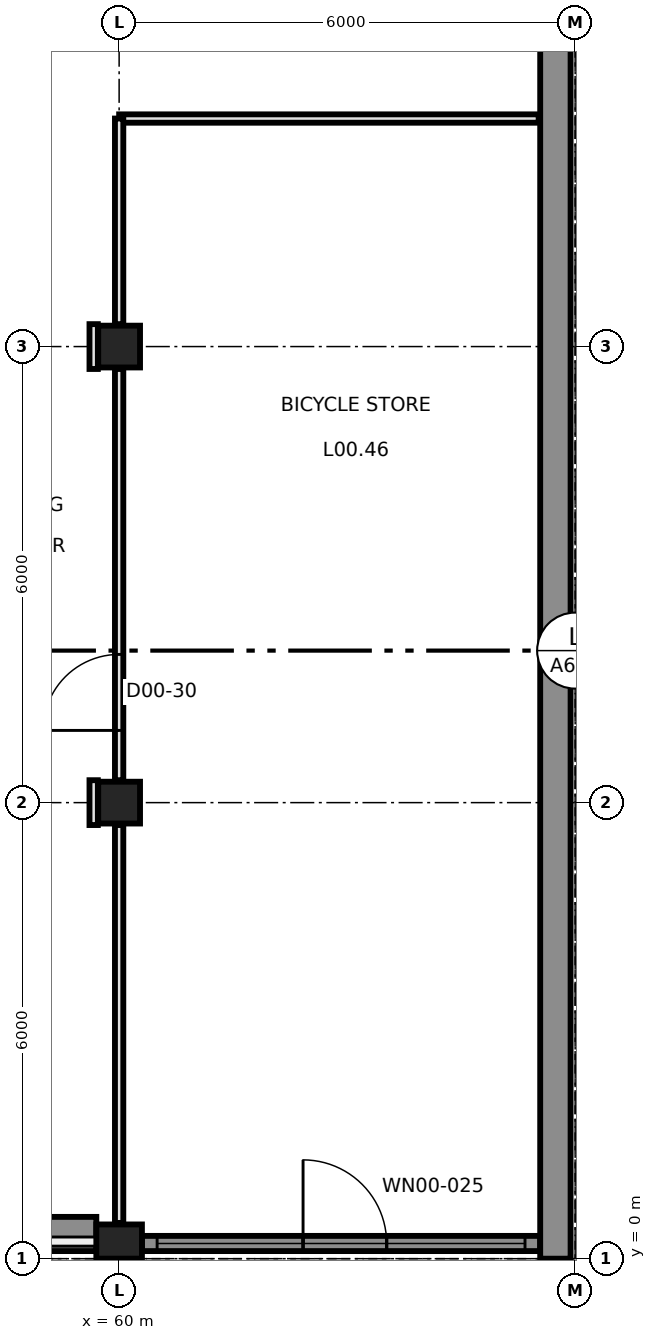
"""IFC4 building model, lengths in metres.
Left out: names, types, materials, properties, quantities, classifications, styles, units other than length and angle.
Written with IfcOpenShell. Run it as: python <this file> out.ifc"""

import sys

from ifc_helpers import new_model, si_unit, direction, frame, frame_2d, origin, origin_2d, place, context, subcontext, project, spatial, rectangle, extrude, element, fill, save


model = new_model("IFC4")
c1 = context("Model", 3, precision=1e-05, world=origin(), true_north=direction((0.0, 1.0)))
c2 = subcontext(c1, "Body", "Model", "MODEL_VIEW")
j1 = project(units=[si_unit("LENGTHUNIT", "METRE"), si_unit("PLANEANGLEUNIT", "RADIAN")], contexts=[c1])
p1 = place(None, origin())
s1 = spatial("IfcSite", under=j1, at=p1, CompositionType="ELEMENT")
p2 = place(p1, origin())
s2 = spatial("IfcBuilding", under=s1, at=p2, CompositionType="ELEMENT")
p3 = place(p2, origin())
s3 = spatial("IfcBuildingStorey", under=s2, at=p3, CompositionType="ELEMENT", Elevation=0.0)
p4 = place(p3, frame((60.0, 0.226, -0.3), z_axis=(0.0, 0.0, 1.0), x_axis=(1.0, 0.0, 0.0)))
e1 = element("IfcColumn", 1, at=p4, inside=s3, PredefinedType="COLUMN", context=c2, shape_type="SweptSolid", body=[
    extrude(rectangle(XDim=0.6, YDim=0.45, at=origin_2d()), origin(), (0.0, 0.0, 1.0), 7.3),
])
for number, where, z_axis, x_axis in (
    (2, (60.0, 6.0, -0.3), (0.0, 0.0, 1.0), (1.0, 0.0, 0.0)),
    (3, (60.0, 12.0, -0.3), (0.0, 0.0, 1.0), (1.0, 0.0, 0.0)),
):
    element("IfcColumn", number, at=place(p3, frame(where, z_axis=z_axis, x_axis=x_axis)), inside=s3, PredefinedType="COLUMN", context=c2, shape_type="SweptSolid", body=[
        extrude(rectangle(XDim=0.55, YDim=0.55, at=origin_2d()), origin(), (0.0, 0.0, 1.0), 7.3),
    ])
p5 = place(p3, frame((65.74, 0.0, -0.3), z_axis=(0.0, 0.0, 1.0), x_axis=(0.0, 1.0, 0.0)))
e4 = element("IfcWall", 4, at=p5, inside=s3, PredefinedType="SOLIDWALL", context=c2, shape_type="SweptSolid", body=[
    extrude(rectangle(XDim=18.0, YDim=0.4, at=frame_2d((9.0, 0.0))), origin(), (0.0, 0.0, 1.0), 7.3),
])
p6 = place(p3, frame((65.54, 0.2, 0.0), z_axis=(0.0, 0.0, 1.0), x_axis=(-1.0, 0.0, 0.0)))
e5 = element("IfcWall", 5, at=p6, inside=s3, PredefinedType="SOLIDWALL", context=c2, shape_type="SweptSolid", body=[
    extrude(rectangle(XDim=5.24, YDim=0.2, at=frame_2d((2.62, 0.0))), origin(), (0.0, 0.0, 1.0), 6.75),
])
p7 = place(p6, frame((2.02, 0.0, 0.0)))
e6 = element("IfcOpeningElement", 6, at=p7, cuts=e5, PredefinedType="OPENING", context=c2, shape_type="SweptSolid", body=[
    extrude(rectangle(XDim=1.1, YDim=2.4, at=frame_2d((0.55, 1.2))), frame((0.0, 0.11, 0.0), z_axis=(0.0, -1.0, 0.0), x_axis=(1.0, 0.0, 0.0)), (0.0, 0.0, 1.0), 0.22),
])
p8 = place(p6, frame((2.02, 0.0, 2.5)))
e7 = element("IfcOpeningElement", 7, at=p8, cuts=e5, PredefinedType="OPENING", context=c2, shape_type="SweptSolid", body=[
    extrude(rectangle(XDim=1.1, YDim=3.9, at=frame_2d((0.55, 1.95))), frame((0.0, 0.11, 0.0), z_axis=(0.0, -1.0, 0.0), x_axis=(1.0, 0.0, 0.0)), (0.0, 0.0, 1.0), 0.22),
])
p9 = place(p6, frame((0.2, 0.0, 0.1)))
e8 = element("IfcOpeningElement", 8, at=p9, cuts=e5, PredefinedType="OPENING", context=c2, shape_type="SweptSolid", body=[
    extrude(rectangle(XDim=1.82, YDim=6.3, at=frame_2d((0.91, 3.15))), frame((0.0, 0.11, 0.0), z_axis=(0.0, -1.0, 0.0), x_axis=(1.0, 0.0, 0.0)), (0.0, 0.0, 1.0), 0.22),
])
p10 = place(p6, frame((3.12, 0.0, 0.1)))
e9 = element("IfcOpeningElement", 9, at=p10, cuts=e5, PredefinedType="OPENING", context=c2, shape_type="SweptSolid", body=[
    extrude(rectangle(XDim=1.92, YDim=6.3, at=frame_2d((0.96, 3.15))), frame((0.0, 0.11, 0.0), z_axis=(0.0, -1.0, 0.0), x_axis=(1.0, 0.0, 0.0)), (0.0, 0.0, 1.0), 0.22),
])
p11 = place(p3, frame((59.7, 0.325, 0.0), z_axis=(0.0, 0.0, 1.0), x_axis=(-1.0, 0.0, 0.0)))
e10 = element("IfcWall", 10, at=p11, inside=s3, PredefinedType="SOLIDWALL", context=c2, shape_type="SweptSolid", body=[
    extrude(rectangle(XDim=5.4, YDim=0.45, at=frame_2d((2.7, 0.0))), origin(), (0.0, 0.0, 1.0), 4.8),
])
p12 = place(p3, frame((60.0, 15.0, 0.0), z_axis=(0.0, 0.0, 1.0), x_axis=(1.0, 0.0, 0.0)))
e11 = element("IfcWall", 11, at=p12, inside=s3, PredefinedType="PARTITIONING", context=c2, shape_type="SweptSolid", body=[
    extrude(rectangle(XDim=5.52, YDim=0.11, at=frame_2d((2.76, 0.0))), origin(), (0.0, 0.0, 1.0), 6.15),
])
p13 = place(p3, frame((60.0, 12.295, 0.0), z_axis=(0.0, 0.0, 1.0), x_axis=(0.0, 1.0, 0.0)))
e12 = element("IfcWall", 12, at=p13, inside=s3, PredefinedType="PARTITIONING", context=c2, shape_type="SweptSolid", body=[
    extrude(rectangle(XDim=2.705, YDim=0.11, at=frame_2d((1.353, 0.0))), origin(), (0.0, 0.0, 1.0), 6.15),
])
p14 = place(p3, frame((60.0, 6.295, 0.0), z_axis=(0.0, 0.0, 1.0), x_axis=(0.0, 1.0, 0.0)))
e13 = element("IfcWall", 13, at=p14, inside=s3, PredefinedType="PARTITIONING", context=c2, shape_type="SweptSolid", body=[
    extrude(rectangle(XDim=5.41, YDim=0.11, at=frame_2d((2.705, 0.0))), origin(), (0.0, 0.0, 1.0), 6.15),
])
p15 = place(p14, frame((0.655, 0.0, 0.0)))
e14 = element("IfcOpeningElement", 14, at=p15, cuts=e13, PredefinedType="OPENING", context=c2, shape_type="SweptSolid", body=[
    extrude(rectangle(XDim=1.0, YDim=2.1, at=frame_2d((0.5, 1.05))), frame((0.0, 0.065, 0.0), z_axis=(0.0, -1.0, 0.0), x_axis=(1.0, 0.0, 0.0)), (0.0, 0.0, 1.0), 0.13),
])
p16 = place(p3, frame((60.0, 0.47, 0.0), z_axis=(0.0, 0.0, 1.0), x_axis=(0.0, 1.0, 0.0)))
e15 = element("IfcWall", 15, at=p16, inside=s3, PredefinedType="PARTITIONING", context=c2, shape_type="SweptSolid", body=[
    extrude(rectangle(XDim=5.235, YDim=0.11, at=frame_2d((2.617, 0.0))), origin(), (0.0, 0.0, 1.0), 6.15),
])
for number, where, z_axis, x_axis in (
    (16, (59.665, 11.705, 0.0), (0.0, 0.0, 1.0), (0.0, 1.0, 0.0)),
    (17, (59.665, 5.705, 0.0), (0.0, 0.0, 1.0), (0.0, 1.0, 0.0)),
):
    element("IfcWall", number, at=place(p3, frame(where, z_axis=z_axis, x_axis=x_axis)), inside=s3, PredefinedType="PARTITIONING", context=c2, shape_type="SweptSolid", body=[
        extrude(rectangle(XDim=0.59, YDim=0.11, at=frame_2d((0.295, 0.0))), origin(), (0.0, 0.0, 1.0), 6.15),
    ])
p17 = place(p7, origin())
e18 = element("IfcDoor", 18, at=p17, inside=s3, OperationType="SINGLE_SWING_RIGHT", PredefinedType="DOOR", context=c2, shape_type="SweptSolid", body=[
    extrude(rectangle(XDim=1.1, YDim=2.4, at=frame_2d((0.55, 1.2))), frame((0.0, 0.025, 0.0), z_axis=(0.0, -1.0, 0.0), x_axis=(1.0, 0.0, 0.0)), (0.0, 0.0, 1.0), 0.05),
])
fill(e6, e18)
p18 = place(p8, origin())
e19 = element("IfcWindow", 19, at=p18, inside=s3, PartitioningType="SINGLE_PANEL", PredefinedType="WINDOW", context=c2, shape_type="SweptSolid", body=[
    extrude(rectangle(XDim=1.1, YDim=3.9, at=frame_2d((0.55, 1.95))), frame((0.0, 0.03, 0.0), z_axis=(0.0, -1.0, 0.0), x_axis=(1.0, 0.0, 0.0)), (0.0, 0.0, 1.0), 0.06),
])
fill(e7, e19)
p19 = place(p9, origin())
e20 = element("IfcWindow", 20, at=p19, inside=s3, PartitioningType="SINGLE_PANEL", PredefinedType="WINDOW", context=c2, shape_type="SweptSolid", body=[
    extrude(rectangle(XDim=1.82, YDim=6.3, at=frame_2d((0.91, 3.15))), frame((0.0, 0.03, 0.0), z_axis=(0.0, -1.0, 0.0), x_axis=(1.0, 0.0, 0.0)), (0.0, 0.0, 1.0), 0.06),
])
fill(e8, e20)
p20 = place(p10, origin())
e21 = element("IfcWindow", 21, at=p20, inside=s3, PartitioningType="SINGLE_PANEL", PredefinedType="WINDOW", context=c2, shape_type="SweptSolid", body=[
    extrude(rectangle(XDim=1.92, YDim=6.3, at=frame_2d((0.96, 3.15))), frame((0.0, 0.03, 0.0), z_axis=(0.0, -1.0, 0.0), x_axis=(1.0, 0.0, 0.0)), (0.0, 0.0, 1.0), 0.06),
])
fill(e9, e21)
p21 = place(p15, frame((1.0, 0.0, 0.0), z_axis=(0.0, 0.0, 1.0), x_axis=(-1.0, 0.0, 0.0)))
e22 = element("IfcDoor", 22, at=p21, inside=s3, OperationType="SINGLE_SWING_LEFT", PredefinedType="DOOR", context=c2, shape_type="SweptSolid", body=[
    extrude(rectangle(XDim=1.0, YDim=2.1, at=frame_2d((0.5, 1.05))), frame((0.0, 0.025, 0.0), z_axis=(0.0, -1.0, 0.0), x_axis=(1.0, 0.0, 0.0)), (0.0, 0.0, 1.0), 0.05),
])
fill(e14, e22)
save(model, sys.argv[1])
